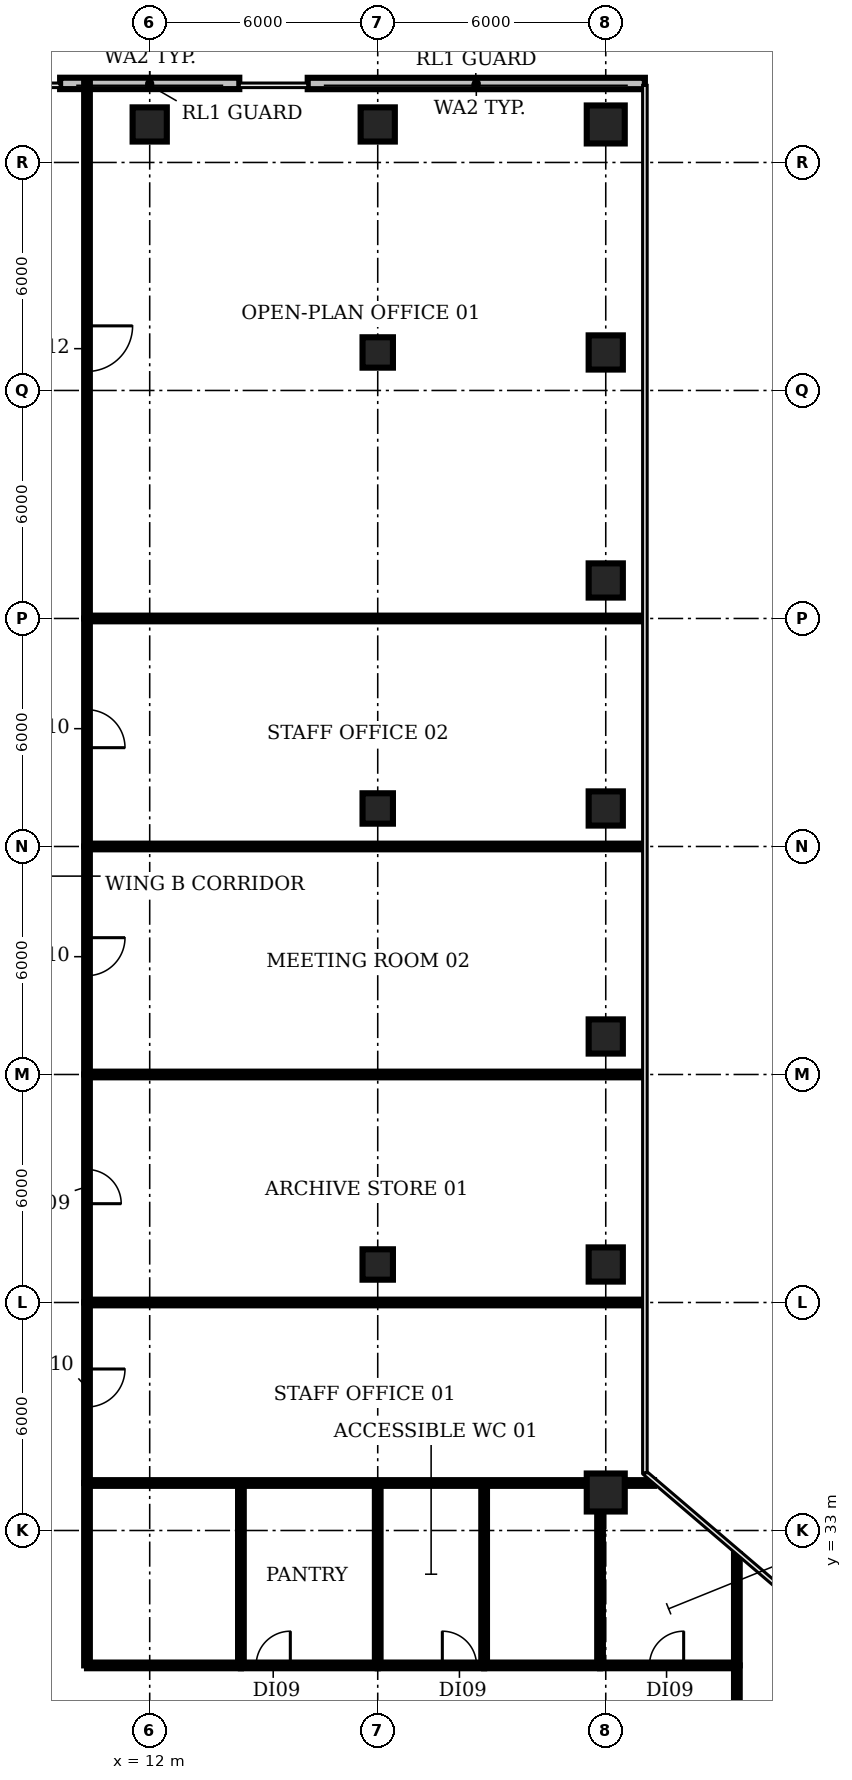
"""IFC4 building model, lengths in metres.
Left out: names, types, materials, properties, quantities, classifications, styles, units other than length and angle.
Written with IfcOpenShell. Run it as: python <this file> out.ifc"""

import sys

from ifc_helpers import new_model, si_unit, direction, frame, frame_2d, origin, origin_2d, place, context, subcontext, project, spatial, rectangle, circle, extrude, element, fill, save


model = new_model("IFC4")
c1 = context("Model", 3, precision=1e-05, world=origin(), true_north=direction((0.0, 1.0)))
c2 = subcontext(c1, "Body", "Model", "MODEL_VIEW")
j1 = project(units=[si_unit("LENGTHUNIT", "METRE"), si_unit("PLANEANGLEUNIT", "RADIAN")], contexts=[c1])
p1 = place(None, origin())
s1 = spatial("IfcSite", under=j1, at=p1, CompositionType="ELEMENT")
p2 = place(p1, origin())
s2 = spatial("IfcBuilding", under=s1, at=p2, CompositionType="ELEMENT")
p3 = place(p2, frame((0.0, 0.0, 92.0)))
s3 = spatial("IfcBuildingStorey", under=s2, at=p3, CompositionType="ELEMENT", Elevation=92.0)
p4 = place(p3, frame((12.0, 70.0, 0.0), z_axis=(0.0, 0.0, 1.0), x_axis=(1.0, 0.0, 0.0)))
e1 = element("IfcColumn", 1, at=p4, inside=s3, PredefinedType="COLUMN", context=c2, shape_type="SweptSolid", body=[
    extrude(rectangle(XDim=0.9, YDim=0.9, at=origin_2d()), origin(), (0.0, 0.0, 1.0), 3.85),
])
for number, where, z_axis, x_axis in (
    (2, (18.0, 40.0, 0.0), (0.0, 0.0, 1.0), (1.0, 0.0, 0.0)),
    (3, (18.0, 52.0, 0.0), (0.0, 0.0, 1.0), (1.0, 0.0, 0.0)),
    (4, (18.0, 64.0, 0.0), (0.0, 0.0, 1.0), (1.0, 0.0, 0.0)),
):
    element("IfcColumn", number, at=place(p3, frame(where, z_axis=z_axis, x_axis=x_axis)), inside=s3, PredefinedType="COLUMN", context=c2, shape_type="SweptSolid", body=[
        extrude(rectangle(XDim=0.8, YDim=0.8, at=origin_2d()), origin(), (0.0, 0.0, 1.0), 3.85),
    ])
p5 = place(p3, frame((18.0, 70.0, 0.0), z_axis=(0.0, 0.0, 1.0), x_axis=(1.0, 0.0, 0.0)))
e5 = element("IfcColumn", 5, at=p5, inside=s3, PredefinedType="COLUMN", context=c2, shape_type="SweptSolid", body=[
    extrude(rectangle(XDim=0.9, YDim=0.9, at=origin_2d()), origin(), (0.0, 0.0, 1.0), 3.85),
])
p6 = place(p3, frame((24.0, 34.0, 0.0), z_axis=(0.0, 0.0, 1.0), x_axis=(1.0, 0.0, 0.0)))
e6 = element("IfcColumn", 6, at=p6, inside=s3, PredefinedType="COLUMN", context=c2, shape_type="SweptSolid", body=[
    extrude(circle(Radius=0.5, at=origin_2d()), origin(), (0.0, 0.0, 1.0), 3.85),
])
for number, where, z_axis, x_axis in (
    (7, (24.0, 40.0, 0.0), (0.0, 0.0, 1.0), (1.0, 0.0, 0.0)),
    (8, (24.0, 46.0, 0.0), (0.0, 0.0, 1.0), (1.0, 0.0, 0.0)),
    (9, (24.0, 52.0, 0.0), (0.0, 0.0, 1.0), (1.0, 0.0, 0.0)),
    (10, (24.0, 58.0, 0.0), (0.0, 0.0, 1.0), (1.0, 0.0, 0.0)),
    (11, (24.0, 64.0, 0.0), (0.0, 0.0, 1.0), (1.0, 0.0, 0.0)),
):
    element("IfcColumn", number, at=place(p3, frame(where, z_axis=z_axis, x_axis=x_axis)), inside=s3, PredefinedType="COLUMN", context=c2, shape_type="SweptSolid", body=[
        extrude(rectangle(XDim=0.9, YDim=0.9, at=origin_2d()), origin(), (0.0, 0.0, 1.0), 3.85),
    ])
p7 = place(p3, frame((24.0, 70.0, 0.0), z_axis=(0.0, 0.0, 1.0), x_axis=(1.0, 0.0, 0.0)))
e12 = element("IfcColumn", 12, at=p7, inside=s3, PredefinedType="COLUMN", context=c2, shape_type="SweptSolid", body=[
    extrude(circle(Radius=0.5, at=origin_2d()), origin(), (0.0, 0.0, 1.0), 3.85),
])
p8 = place(p3, frame((25.03, 71.078, 0.0), z_axis=(0.0, 0.0, 1.0), x_axis=(-1.0, 0.0, 0.0)))
e13 = element("IfcWall", 13, at=p8, inside=s3, PredefinedType="SOLIDWALL", context=c2, shape_type="SweptSolid", body=[
    extrude(rectangle(XDim=8.873, YDim=0.3, at=frame_2d((4.436, 0.0))), origin(), (0.0, 0.0, 1.0), 3.85),
])
p9 = place(p3, frame((14.357, 71.08, 0.0), z_axis=(0.0, 0.0, 1.0), x_axis=(-1.0, 0.0, 0.0)))
e14 = element("IfcWall", 14, at=p9, inside=s3, PredefinedType="SOLIDWALL", context=c2, shape_type="SweptSolid", body=[
    extrude(rectangle(XDim=4.715, YDim=0.3, at=frame_2d((2.357, 0.0))), origin(), (0.0, 0.0, 1.0), 3.85),
])
p10 = place(p3, frame((10.35, 29.45, 0.0), z_axis=(0.0, 0.0, 1.0), x_axis=(0.0, 1.0, 0.0)))
e15 = element("IfcWall", 15, at=p10, inside=s3, PredefinedType="PARTITIONING", context=c2, shape_type="SweptSolid", body=[
    extrude(rectangle(XDim=4.8, YDim=0.15, at=frame_2d((2.4, 0.0))), origin(), (0.0, 0.0, 1.0), 2.83),
])
p11 = place(p3, frame((10.35, 29.45, 0.0), z_axis=(0.0, 0.0, 1.0), x_axis=(1.0, 0.0, 0.0)))
e16 = element("IfcWall", 16, at=p11, inside=s3, PredefinedType="PARTITIONING", context=c2, shape_type="SweptSolid", body=[
    extrude(rectangle(XDim=4.05, YDim=0.15, at=frame_2d((2.025, 0.0))), origin(), (0.0, 0.0, 1.0), 2.83),
])
p12 = place(p3, frame((10.35, 34.25, 0.0), z_axis=(0.0, 0.0, 1.0), x_axis=(1.0, 0.0, 0.0)))
e17 = element("IfcWall", 17, at=p12, inside=s3, PredefinedType="PARTITIONING", context=c2, shape_type="SweptSolid", body=[
    extrude(rectangle(XDim=14.92, YDim=0.15, at=frame_2d((7.46, 0.0))), origin(), (0.0, 0.0, 1.0), 2.83),
])
p13 = place(p3, frame((10.35, 39.0, 0.0), z_axis=(0.0, 0.0, 1.0), x_axis=(0.0, -1.0, 0.0)))
e18 = element("IfcWall", 18, at=p13, inside=s3, PredefinedType="PARTITIONING", context=c2, shape_type="SweptSolid", body=[
    extrude(rectangle(XDim=4.75, YDim=0.15, at=frame_2d((2.375, 0.0))), origin(), (0.0, 0.0, 1.0), 2.83),
])
p14 = place(p13, frame((1.75, 0.0, 0.0)))
e19 = element("IfcOpeningElement", 19, at=p14, cuts=e18, PredefinedType="OPENING", context=c2, shape_type="SweptSolid", body=[
    extrude(rectangle(XDim=1.0, YDim=2.1, at=frame_2d((0.5, 1.05))), frame((0.0, 0.085, 0.0), z_axis=(0.0, -1.0, 0.0), x_axis=(1.0, 0.0, 0.0)), (0.0, 0.0, 1.0), 0.17),
])
p15 = place(p3, frame((10.35, 39.0, 0.0), z_axis=(0.0, 0.0, 1.0), x_axis=(1.0, 0.0, 0.0)))
e20 = element("IfcWall", 20, at=p15, inside=s3, PredefinedType="PARTITIONING", context=c2, shape_type="SweptSolid", body=[
    extrude(rectangle(XDim=14.63, YDim=0.15, at=frame_2d((7.315, 0.0))), origin(), (0.0, 0.0, 1.0), 2.83),
])
p16 = place(p3, frame((10.35, 45.0, 0.0), z_axis=(0.0, 0.0, 1.0), x_axis=(0.0, -1.0, 0.0)))
e21 = element("IfcWall", 21, at=p16, inside=s3, PredefinedType="PARTITIONING", context=c2, shape_type="SweptSolid", body=[
    extrude(rectangle(XDim=6.0, YDim=0.15, at=frame_2d((3.0, 0.0))), origin(), (0.0, 0.0, 1.0), 2.83),
])
p17 = place(p16, frame((2.5, 0.0, 0.0)))
e22 = element("IfcOpeningElement", 22, at=p17, cuts=e21, PredefinedType="OPENING", context=c2, shape_type="SweptSolid", body=[
    extrude(rectangle(XDim=0.9, YDim=2.1, at=frame_2d((0.45, 1.05))), frame((0.0, 0.085, 0.0), z_axis=(0.0, -1.0, 0.0), x_axis=(1.0, 0.0, 0.0)), (0.0, 0.0, 1.0), 0.17),
])
p18 = place(p3, frame((10.35, 45.0, 0.0), z_axis=(0.0, 0.0, 1.0), x_axis=(1.0, 0.0, 0.0)))
e23 = element("IfcWall", 23, at=p18, inside=s3, PredefinedType="PARTITIONING", context=c2, shape_type="SweptSolid", body=[
    extrude(rectangle(XDim=14.63, YDim=0.15, at=frame_2d((7.315, 0.0))), origin(), (0.0, 0.0, 1.0), 2.83),
])
p19 = place(p3, frame((10.35, 51.0, 0.0), z_axis=(0.0, 0.0, 1.0), x_axis=(0.0, -1.0, 0.0)))
e24 = element("IfcWall", 24, at=p19, inside=s3, PredefinedType="PARTITIONING", context=c2, shape_type="SweptSolid", body=[
    extrude(rectangle(XDim=6.0, YDim=0.15, at=frame_2d((3.0, 0.0))), origin(), (0.0, 0.0, 1.0), 2.83),
])
p20 = place(p19, frame((2.4, 0.0, 0.0)))
e25 = element("IfcOpeningElement", 25, at=p20, cuts=e24, PredefinedType="OPENING", context=c2, shape_type="SweptSolid", body=[
    extrude(rectangle(XDim=1.0, YDim=2.1, at=frame_2d((0.5, 1.05))), frame((0.0, 0.085, 0.0), z_axis=(0.0, -1.0, 0.0), x_axis=(1.0, 0.0, 0.0)), (0.0, 0.0, 1.0), 0.17),
])
p21 = place(p3, frame((10.35, 51.0, 0.0), z_axis=(0.0, 0.0, 1.0), x_axis=(1.0, 0.0, 0.0)))
e26 = element("IfcWall", 26, at=p21, inside=s3, PredefinedType="PARTITIONING", context=c2, shape_type="SweptSolid", body=[
    extrude(rectangle(XDim=14.63, YDim=0.15, at=frame_2d((7.315, 0.0))), origin(), (0.0, 0.0, 1.0), 2.83),
])
p22 = place(p3, frame((10.35, 57.0, 0.0), z_axis=(0.0, 0.0, 1.0), x_axis=(0.0, -1.0, 0.0)))
e27 = element("IfcWall", 27, at=p22, inside=s3, PredefinedType="PARTITIONING", context=c2, shape_type="SweptSolid", body=[
    extrude(rectangle(XDim=6.0, YDim=0.15, at=frame_2d((3.0, 0.0))), origin(), (0.0, 0.0, 1.0), 2.83),
])
p23 = place(p22, frame((2.4, 0.0, 0.0)))
e28 = element("IfcOpeningElement", 28, at=p23, cuts=e27, PredefinedType="OPENING", context=c2, shape_type="SweptSolid", body=[
    extrude(rectangle(XDim=1.0, YDim=2.1, at=frame_2d((0.5, 1.05))), frame((0.0, 0.085, 0.0), z_axis=(0.0, -1.0, 0.0), x_axis=(1.0, 0.0, 0.0)), (0.0, 0.0, 1.0), 0.17),
])
p24 = place(p3, frame((10.35, 57.0, 0.0), z_axis=(0.0, 0.0, 1.0), x_axis=(1.0, 0.0, 0.0)))
e29 = element("IfcWall", 29, at=p24, inside=s3, PredefinedType="PARTITIONING", context=c2, shape_type="SweptSolid", body=[
    extrude(rectangle(XDim=14.63, YDim=0.15, at=frame_2d((7.315, 0.0))), origin(), (0.0, 0.0, 1.0), 2.83),
])
p25 = place(p3, frame((10.35, 71.09, 0.0), z_axis=(0.0, 0.0, 1.0), x_axis=(0.0, -1.0, 0.0)))
e30 = element("IfcWall", 30, at=p25, inside=s3, PredefinedType="PARTITIONING", context=c2, shape_type="SweptSolid", body=[
    extrude(rectangle(XDim=14.09, YDim=0.15, at=frame_2d((7.045, 0.0))), origin(), (0.0, 0.0, 1.0), 2.83),
])
p26 = place(p25, frame((6.39, 0.0, 0.0)))
e31 = element("IfcOpeningElement", 31, at=p26, cuts=e30, PredefinedType="OPENING", context=c2, shape_type="SweptSolid", body=[
    extrude(rectangle(XDim=1.2, YDim=2.1, at=frame_2d((0.6, 1.05))), frame((0.0, 0.085, 0.0), z_axis=(0.0, -1.0, 0.0), x_axis=(1.0, 0.0, 0.0)), (0.0, 0.0, 1.0), 0.17),
])
p27 = place(p3, frame((14.4, 29.45, 0.0), z_axis=(0.0, 0.0, 1.0), x_axis=(0.0, 1.0, 0.0)))
e32 = element("IfcWall", 32, at=p27, inside=s3, PredefinedType="PARTITIONING", context=c2, shape_type="SweptSolid", body=[
    extrude(rectangle(XDim=4.8, YDim=0.15, at=frame_2d((2.4, 0.0))), origin(), (0.0, 0.0, 1.0), 2.83),
])
p28 = place(p3, frame((14.4, 29.45, 0.0), z_axis=(0.0, 0.0, 1.0), x_axis=(1.0, 0.0, 0.0)))
e33 = element("IfcWall", 33, at=p28, inside=s3, PredefinedType="PARTITIONING", context=c2, shape_type="SweptSolid", body=[
    extrude(rectangle(XDim=3.6, YDim=0.15, at=frame_2d((1.8, 0.0))), origin(), (0.0, 0.0, 1.0), 2.83),
])
p29 = place(p28, frame((0.4, 0.0, 0.0)))
e34 = element("IfcOpeningElement", 34, at=p29, cuts=e33, PredefinedType="OPENING", context=c2, shape_type="SweptSolid", body=[
    extrude(rectangle(XDim=0.9, YDim=2.1, at=frame_2d((0.45, 1.05))), frame((0.0, 0.085, 0.0), z_axis=(0.0, -1.0, 0.0), x_axis=(1.0, 0.0, 0.0)), (0.0, 0.0, 1.0), 0.17),
])
p30 = place(p3, frame((18.0, 29.45, 0.0), z_axis=(0.0, 0.0, 1.0), x_axis=(0.0, 1.0, 0.0)))
e35 = element("IfcWall", 35, at=p30, inside=s3, PredefinedType="PARTITIONING", context=c2, shape_type="SweptSolid", body=[
    extrude(rectangle(XDim=4.8, YDim=0.15, at=frame_2d((2.4, 0.0))), origin(), (0.0, 0.0, 1.0), 2.83),
])
p31 = place(p3, frame((18.0, 29.45, 0.0), z_axis=(0.0, 0.0, 1.0), x_axis=(1.0, 0.0, 0.0)))
e36 = element("IfcWall", 36, at=p31, inside=s3, PredefinedType="PARTITIONING", context=c2, shape_type="SweptSolid", body=[
    extrude(rectangle(XDim=2.8, YDim=0.15, at=frame_2d((1.4, 0.0))), origin(), (0.0, 0.0, 1.0), 2.83),
])
p32 = place(p31, frame((1.7, 0.0, 0.0)))
e37 = element("IfcOpeningElement", 37, at=p32, cuts=e36, PredefinedType="OPENING", context=c2, shape_type="SweptSolid", body=[
    extrude(rectangle(XDim=0.9, YDim=2.1, at=frame_2d((0.45, 1.05))), frame((0.0, 0.085, 0.0), z_axis=(0.0, -1.0, 0.0), x_axis=(1.0, 0.0, 0.0)), (0.0, 0.0, 1.0), 0.17),
])
p33 = place(p3, frame((20.8, 29.45, 0.0), z_axis=(0.0, 0.0, 1.0), x_axis=(0.0, 1.0, 0.0)))
e38 = element("IfcWall", 38, at=p33, inside=s3, PredefinedType="PARTITIONING", context=c2, shape_type="SweptSolid", body=[
    extrude(rectangle(XDim=4.8, YDim=0.15, at=frame_2d((2.4, 0.0))), origin(), (0.0, 0.0, 1.0), 2.83),
])
p34 = place(p3, frame((20.8, 29.45, 0.0), z_axis=(0.0, 0.0, 1.0), x_axis=(1.0, 0.0, 0.0)))
e39 = element("IfcWall", 39, at=p34, inside=s3, PredefinedType="PARTITIONING", context=c2, shape_type="SweptSolid", body=[
    extrude(rectangle(XDim=3.05, YDim=0.15, at=frame_2d((1.525, 0.0))), origin(), (0.0, 0.0, 1.0), 2.83),
])
p35 = place(p3, frame((23.85, 29.45, 0.0), z_axis=(0.0, 0.0, 1.0), x_axis=(0.0, 1.0, 0.0)))
e40 = element("IfcWall", 40, at=p35, inside=s3, PredefinedType="PARTITIONING", context=c2, shape_type="SweptSolid", body=[
    extrude(rectangle(XDim=4.8, YDim=0.15, at=frame_2d((2.4, 0.0))), origin(), (0.0, 0.0, 1.0), 2.83),
])
p36 = place(p3, frame((23.85, 29.45, 0.0), z_axis=(0.0, 0.0, 1.0), x_axis=(1.0, 0.0, 0.0)))
e41 = element("IfcWall", 41, at=p36, inside=s3, PredefinedType="PARTITIONING", context=c2, shape_type="SweptSolid", body=[
    extrude(rectangle(XDim=3.6, YDim=0.15, at=frame_2d((1.8, 0.0))), origin(), (0.0, 0.0, 1.0), 2.83),
])
p37 = place(p36, frame((1.3, 0.0, 0.0)))
e42 = element("IfcOpeningElement", 42, at=p37, cuts=e41, PredefinedType="OPENING", context=c2, shape_type="SweptSolid", body=[
    extrude(rectangle(XDim=0.9, YDim=2.1, at=frame_2d((0.45, 1.05))), frame((0.0, 0.085, 0.0), z_axis=(0.0, -1.0, 0.0), x_axis=(1.0, 0.0, 0.0)), (0.0, 0.0, 1.0), 0.17),
])
p38 = place(p3, frame((27.45, 25.55, 0.0), z_axis=(0.0, 0.0, 1.0), x_axis=(0.0, 1.0, 0.0)))
e43 = element("IfcWall", 43, at=p38, inside=s3, PredefinedType="PARTITIONING", context=c2, shape_type="SweptSolid", body=[
    extrude(rectangle(XDim=3.9, YDim=0.15, at=frame_2d((1.95, 0.0))), origin(), (0.0, 0.0, 1.0), 2.83),
])
p39 = place(p3, frame((27.45, 29.45, 0.0), z_axis=(0.0, 0.0, 1.0), x_axis=(0.0, 1.0, 0.0)))
e44 = element("IfcWall", 44, at=p39, inside=s3, PredefinedType="PARTITIONING", context=c2, shape_type="SweptSolid", body=[
    extrude(rectangle(XDim=2.93, YDim=0.15, at=frame_2d((1.465, 0.0))), origin(), (0.0, 0.0, 1.0), 2.83),
])
p40 = place(p14, origin())
e45 = element("IfcDoor", 45, at=p40, inside=s3, OperationType="SINGLE_SWING_LEFT", PredefinedType="DOOR", context=c2, shape_type="SweptSolid", body=[
    extrude(rectangle(XDim=1.0, YDim=2.1, at=frame_2d((0.5, 1.05))), frame((0.0, 0.025, 0.0), z_axis=(0.0, -1.0, 0.0), x_axis=(1.0, 0.0, 0.0)), (0.0, 0.0, 1.0), 0.05),
])
fill(e19, e45)
p41 = place(p17, origin())
e46 = element("IfcDoor", 46, at=p41, inside=s3, OperationType="SINGLE_SWING_RIGHT", PredefinedType="DOOR", context=c2, shape_type="SweptSolid", body=[
    extrude(rectangle(XDim=0.9, YDim=2.1, at=frame_2d((0.45, 1.05))), frame((0.0, 0.025, 0.0), z_axis=(0.0, -1.0, 0.0), x_axis=(1.0, 0.0, 0.0)), (0.0, 0.0, 1.0), 0.05),
])
fill(e22, e46)
p42 = place(p20, origin())
e47 = element("IfcDoor", 47, at=p42, inside=s3, OperationType="SINGLE_SWING_LEFT", PredefinedType="DOOR", context=c2, shape_type="SweptSolid", body=[
    extrude(rectangle(XDim=1.0, YDim=2.1, at=frame_2d((0.5, 1.05))), frame((0.0, 0.025, 0.0), z_axis=(0.0, -1.0, 0.0), x_axis=(1.0, 0.0, 0.0)), (0.0, 0.0, 1.0), 0.05),
])
fill(e25, e47)
p43 = place(p23, origin())
e48 = element("IfcDoor", 48, at=p43, inside=s3, OperationType="SINGLE_SWING_RIGHT", PredefinedType="DOOR", context=c2, shape_type="SweptSolid", body=[
    extrude(rectangle(XDim=1.0, YDim=2.1, at=frame_2d((0.5, 1.05))), frame((0.0, 0.025, 0.0), z_axis=(0.0, -1.0, 0.0), x_axis=(1.0, 0.0, 0.0)), (0.0, 0.0, 1.0), 0.05),
])
fill(e28, e48)
p44 = place(p26, origin())
e49 = element("IfcDoor", 49, at=p44, inside=s3, OperationType="SINGLE_SWING_LEFT", PredefinedType="DOOR", context=c2, shape_type="SweptSolid", body=[
    extrude(rectangle(XDim=1.2, YDim=2.1, at=frame_2d((0.6, 1.05))), frame((0.0, 0.025, 0.0), z_axis=(0.0, -1.0, 0.0), x_axis=(1.0, 0.0, 0.0)), (0.0, 0.0, 1.0), 0.05),
])
fill(e31, e49)
p45 = place(p29, origin())
e50 = element("IfcDoor", 50, at=p45, inside=s3, OperationType="SINGLE_SWING_RIGHT", PredefinedType="DOOR", context=c2, shape_type="SweptSolid", body=[
    extrude(rectangle(XDim=0.9, YDim=2.1, at=frame_2d((0.45, 1.05))), frame((0.0, 0.025, 0.0), z_axis=(0.0, -1.0, 0.0), x_axis=(1.0, 0.0, 0.0)), (0.0, 0.0, 1.0), 0.05),
])
fill(e34, e50)
p46 = place(p32, origin())
e51 = element("IfcDoor", 51, at=p46, inside=s3, OperationType="SINGLE_SWING_LEFT", PredefinedType="DOOR", context=c2, shape_type="SweptSolid", body=[
    extrude(rectangle(XDim=0.9, YDim=2.1, at=frame_2d((0.45, 1.05))), frame((0.0, 0.025, 0.0), z_axis=(0.0, -1.0, 0.0), x_axis=(1.0, 0.0, 0.0)), (0.0, 0.0, 1.0), 0.05),
])
fill(e37, e51)
p47 = place(p37, origin())
e52 = element("IfcDoor", 52, at=p47, inside=s3, OperationType="SINGLE_SWING_RIGHT", PredefinedType="DOOR", context=c2, shape_type="SweptSolid", body=[
    extrude(rectangle(XDim=0.9, YDim=2.1, at=frame_2d((0.45, 1.05))), frame((0.0, 0.025, 0.0), z_axis=(0.0, -1.0, 0.0), x_axis=(1.0, 0.0, 0.0)), (0.0, 0.0, 1.0), 0.05),
])
fill(e42, e52)
save(model, sys.argv[1])
